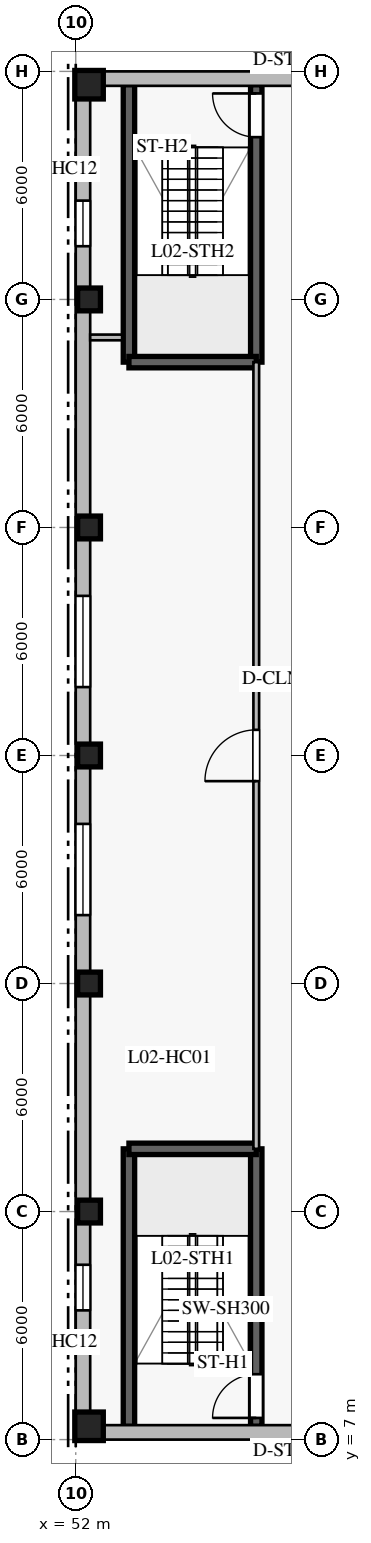
"""IFC4 building model, lengths in metres.
Left out: names, types, materials, properties, quantities, classifications, styles, units other than length and angle.
Written with IfcOpenShell. Run it as: python <this file> out.ifc"""

import sys

from ifc_helpers import new_model, si_unit, direction, frame, frame_2d, origin, origin_2d, place, context, subcontext, project, spatial, rectangle, extrude, element, fill, save


model = new_model("IFC4")
c1 = context("Model", 3, precision=1e-05, world=origin(), true_north=direction((0.0, 1.0)))
c2 = subcontext(c1, "Body", "Model", "MODEL_VIEW")
j1 = project(units=[si_unit("LENGTHUNIT", "METRE"), si_unit("PLANEANGLEUNIT", "RADIAN")], contexts=[c1])
p1 = place(None, origin())
s1 = spatial("IfcSite", under=j1, at=p1, CompositionType="ELEMENT")
p2 = place(p1, origin())
s2 = spatial("IfcBuilding", under=s1, at=p2, CompositionType="ELEMENT")
p3 = place(p2, frame((0.0, 0.0, 9.8)))
s3 = spatial("IfcBuildingStorey", under=s2, at=p3, CompositionType="ELEMENT", Elevation=9.8)
p4 = place(p3, frame((56.75, 7.35, 0.0), z_axis=(0.0, 0.0, 1.0), x_axis=(0.0, 1.0, 0.0)))
e1 = element("IfcWall", 1, at=p4, inside=s3, PredefinedType="SOLIDWALL", context=c2, shape_type="SweptSolid", body=[
    extrude(rectangle(XDim=7.3, YDim=0.3, at=frame_2d((3.65, 0.0))), origin(), (0.0, 0.0, 1.0), 4.34),
])
p5 = place(p4, frame((0.22, 0.0, 0.0)))
e2 = element("IfcOpeningElement", 2, at=p5, cuts=e1, PredefinedType="OPENING", context=c2, shape_type="SweptSolid", body=[
    extrude(rectangle(XDim=1.15, YDim=2.2, at=frame_2d((0.575, 1.1))), frame((0.0, 0.16, 0.0), z_axis=(0.0, -1.0, 0.0), x_axis=(1.0, 0.0, 0.0)), (0.0, 0.0, 1.0), 0.32),
])
p6 = place(p3, frame((53.4, 7.35, 0.0), z_axis=(0.0, 0.0, 1.0), x_axis=(0.0, 1.0, 0.0)))
e3 = element("IfcWall", 3, at=p6, inside=s3, PredefinedType="SOLIDWALL", context=c2, shape_type="SweptSolid", body=[
    extrude(rectangle(XDim=7.3, YDim=0.3, at=frame_2d((3.65, 0.0))), origin(), (0.0, 0.0, 1.0), 4.34),
])
p7 = place(p3, frame((53.4, 14.65, 0.0), z_axis=(0.0, 0.0, 1.0), x_axis=(1.0, 0.0, 0.0)))
e4 = element("IfcWall", 4, at=p7, inside=s3, PredefinedType="SOLIDWALL", context=c2, shape_type="SweptSolid", body=[
    extrude(rectangle(XDim=3.35, YDim=0.3, at=frame_2d((1.675, 0.0))), origin(), (0.0, 0.0, 1.0), 4.34),
])
p8 = place(p3, frame((56.75, 35.35, 0.0), z_axis=(0.0, 0.0, 1.0), x_axis=(0.0, 1.0, 0.0)))
e5 = element("IfcWall", 5, at=p8, inside=s3, PredefinedType="SOLIDWALL", context=c2, shape_type="SweptSolid", body=[
    extrude(rectangle(XDim=7.3, YDim=0.3, at=frame_2d((3.65, 0.0))), origin(), (0.0, 0.0, 1.0), 4.34),
])
p9 = place(p8, frame((5.92, 0.0, 0.0)))
e6 = element("IfcOpeningElement", 6, at=p9, cuts=e5, PredefinedType="OPENING", context=c2, shape_type="SweptSolid", body=[
    extrude(rectangle(XDim=1.15, YDim=2.2, at=frame_2d((0.575, 1.1))), frame((0.0, 0.16, 0.0), z_axis=(0.0, -1.0, 0.0), x_axis=(1.0, 0.0, 0.0)), (0.0, 0.0, 1.0), 0.32),
])
p10 = place(p3, frame((53.4, 35.35, 0.0), z_axis=(0.0, 0.0, 1.0), x_axis=(0.0, 1.0, 0.0)))
e7 = element("IfcWall", 7, at=p10, inside=s3, PredefinedType="SOLIDWALL", context=c2, shape_type="SweptSolid", body=[
    extrude(rectangle(XDim=7.3, YDim=0.3, at=frame_2d((3.65, 0.0))), origin(), (0.0, 0.0, 1.0), 4.34),
])
p11 = place(p3, frame((53.4, 35.35, 0.0), z_axis=(0.0, 0.0, 1.0), x_axis=(1.0, 0.0, 0.0)))
e8 = element("IfcWall", 8, at=p11, inside=s3, PredefinedType="SOLIDWALL", context=c2, shape_type="SweptSolid", body=[
    extrude(rectangle(XDim=3.35, YDim=0.3, at=frame_2d((1.675, 0.0))), origin(), (0.0, 0.0, 1.0), 4.34),
])
p12 = place(p3, frame((52.35, 7.35, 0.0), z_axis=(0.0, 0.0, 1.0), x_axis=(1.0, 0.0, 0.0)))
e9 = element("IfcColumn", 9, at=p12, inside=s3, PredefinedType="COLUMN", context=c2, shape_type="SweptSolid", body=[
    extrude(rectangle(XDim=0.75, YDim=0.75, at=origin_2d()), origin(), (0.0, 0.0, 1.0), 4.6),
])
for number, where, z_axis, x_axis in (
    (10, (52.35, 13.0, 0.0), (0.0, 0.0, 1.0), (1.0, 0.0, 0.0)),
    (11, (52.35, 19.0, 0.0), (0.0, 0.0, 1.0), (1.0, 0.0, 0.0)),
    (12, (52.35, 25.0, 0.0), (0.0, 0.0, 1.0), (1.0, 0.0, 0.0)),
    (13, (52.35, 31.0, 0.0), (0.0, 0.0, 1.0), (1.0, 0.0, 0.0)),
    (14, (52.35, 37.0, 0.0), (0.0, 0.0, 1.0), (1.0, 0.0, 0.0)),
):
    element("IfcColumn", number, at=place(p3, frame(where, z_axis=z_axis, x_axis=x_axis)), inside=s3, PredefinedType="COLUMN", context=c2, shape_type="SweptSolid", body=[
        extrude(rectangle(XDim=0.6, YDim=0.6, at=origin_2d()), origin(), (0.0, 0.0, 1.0), 4.6),
    ])
p13 = place(p3, frame((52.35, 42.65, 0.0), z_axis=(0.0, 0.0, 1.0), x_axis=(1.0, 0.0, 0.0)))
e15 = element("IfcColumn", 15, at=p13, inside=s3, PredefinedType="COLUMN", context=c2, shape_type="SweptSolid", body=[
    extrude(rectangle(XDim=0.75, YDim=0.75, at=origin_2d()), origin(), (0.0, 0.0, 1.0), 4.6),
])
p14 = place(p3, frame((75.0, 7.19, 0.0), z_axis=(0.0, 0.0, 1.0), x_axis=(-1.0, 0.0, 0.0)))
e16 = element("IfcWall", 16, at=p14, inside=s3, PredefinedType="STANDARD", context=c2, shape_type="SweptSolid", body=[
    extrude(rectangle(XDim=23.0, YDim=0.38, at=frame_2d((11.5, 0.0))), origin(), (0.0, 0.0, 1.0), 4.34),
])
p15 = place(p14, frame((10.3, 0.0, 0.95)))
e17 = element("IfcOpeningElement", 17, at=p15, cuts=e16, PredefinedType="OPENING", context=c2, shape_type="SweptSolid", body=[
    extrude(rectangle(XDim=2.4, YDim=1.8, at=frame_2d((1.2, 0.9))), frame((0.0, 0.2, 0.0), z_axis=(0.0, -1.0, 0.0), x_axis=(1.0, 0.0, 0.0)), (0.0, 0.0, 1.0), 0.4),
])
p16 = place(p3, frame((52.0, 42.81, 0.0), z_axis=(0.0, 0.0, 1.0), x_axis=(1.0, 0.0, 0.0)))
e18 = element("IfcWall", 18, at=p16, inside=s3, PredefinedType="STANDARD", context=c2, shape_type="SweptSolid", body=[
    extrude(rectangle(XDim=23.0, YDim=0.38, at=frame_2d((11.5, 0.0))), origin(), (0.0, 0.0, 1.0), 4.34),
])
p17 = place(p16, frame((10.3, 0.0, 0.95)))
e19 = element("IfcOpeningElement", 19, at=p17, cuts=e18, PredefinedType="OPENING", context=c2, shape_type="SweptSolid", body=[
    extrude(rectangle(XDim=2.4, YDim=1.8, at=frame_2d((1.2, 0.9))), frame((0.0, 0.2, 0.0), z_axis=(0.0, -1.0, 0.0), x_axis=(1.0, 0.0, 0.0)), (0.0, 0.0, 1.0), 0.4),
])
p18 = place(p3, frame((52.19, 7.38, 0.0), z_axis=(0.0, 0.0, 1.0), x_axis=(0.0, 1.0, 0.0)))
e20 = element("IfcWall", 20, at=p18, inside=s3, PredefinedType="STANDARD", context=c2, shape_type="SweptSolid", body=[
    extrude(rectangle(XDim=35.24, YDim=0.38, at=frame_2d((17.62, 0.0))), origin(), (0.0, 0.0, 1.0), 4.34),
])
p19 = place(p18, frame((3.02, 0.0, 0.95)))
e21 = element("IfcOpeningElement", 21, at=p19, cuts=e20, PredefinedType="OPENING", context=c2, shape_type="SweptSolid", body=[
    extrude(rectangle(XDim=1.2, YDim=1.8, at=frame_2d((0.6, 0.9))), frame((0.0, 0.2, 0.0), z_axis=(0.0, -1.0, 0.0), x_axis=(1.0, 0.0, 0.0)), (0.0, 0.0, 1.0), 0.4),
])
p20 = place(p18, frame((13.42, 0.0, 0.95)))
e22 = element("IfcOpeningElement", 22, at=p20, cuts=e20, PredefinedType="OPENING", context=c2, shape_type="SweptSolid", body=[
    extrude(rectangle(XDim=2.4, YDim=1.8, at=frame_2d((1.2, 0.9))), frame((0.0, 0.2, 0.0), z_axis=(0.0, -1.0, 0.0), x_axis=(1.0, 0.0, 0.0)), (0.0, 0.0, 1.0), 0.4),
])
p21 = place(p18, frame((19.42, 0.0, 0.95)))
e23 = element("IfcOpeningElement", 23, at=p21, cuts=e20, PredefinedType="OPENING", context=c2, shape_type="SweptSolid", body=[
    extrude(rectangle(XDim=2.4, YDim=1.8, at=frame_2d((1.2, 0.9))), frame((0.0, 0.2, 0.0), z_axis=(0.0, -1.0, 0.0), x_axis=(1.0, 0.0, 0.0)), (0.0, 0.0, 1.0), 0.4),
])
p22 = place(p18, frame((31.02, 0.0, 0.95)))
e24 = element("IfcOpeningElement", 24, at=p22, cuts=e20, PredefinedType="OPENING", context=c2, shape_type="SweptSolid", body=[
    extrude(rectangle(XDim=1.2, YDim=1.8, at=frame_2d((0.6, 0.9))), frame((0.0, 0.2, 0.0), z_axis=(0.0, -1.0, 0.0), x_axis=(1.0, 0.0, 0.0)), (0.0, 0.0, 1.0), 0.4),
])
p23 = place(p3, frame((56.75, 14.65, 0.0), z_axis=(0.0, 0.0, 1.0), x_axis=(0.0, 1.0, 0.0)))
e25 = element("IfcWall", 25, at=p23, inside=s3, PredefinedType="PARTITIONING", context=c2, shape_type="SweptSolid", body=[
    extrude(rectangle(XDim=20.7, YDim=0.15, at=frame_2d((10.35, 0.0))), origin(), (0.0, 0.0, 1.0), 4.34),
])
p24 = place(p23, frame((9.675, 0.0, 0.0)))
e26 = element("IfcOpeningElement", 26, at=p24, cuts=e25, PredefinedType="OPENING", context=c2, shape_type="SweptSolid", body=[
    extrude(rectangle(XDim=1.35, YDim=2.2, at=frame_2d((0.675, 1.1))), frame((0.0, 0.085, 0.0), z_axis=(0.0, -1.0, 0.0), x_axis=(1.0, 0.0, 0.0)), (0.0, 0.0, 1.0), 0.17),
])
p25 = place(p3, frame((52.38, 36.0, 0.0), z_axis=(0.0, 0.0, 1.0), x_axis=(1.0, 0.0, 0.0)))
e27 = element("IfcWall", 27, at=p25, inside=s3, PredefinedType="PARTITIONING", context=c2, shape_type="SweptSolid", body=[
    extrude(rectangle(XDim=0.84, YDim=0.15, at=frame_2d((0.42, 0.0))), origin(), (0.0, 0.0, 1.0), 3.98),
])
p26 = place(p19, origin())
e28 = element("IfcWindow", 28, at=p26, inside=s3, PartitioningType="SINGLE_PANEL", PredefinedType="WINDOW", context=c2, shape_type="SweptSolid", body=[
    extrude(rectangle(XDim=1.2, YDim=1.8, at=frame_2d((0.6, 0.9))), frame((0.0, 0.03, 0.0), z_axis=(0.0, -1.0, 0.0), x_axis=(1.0, 0.0, 0.0)), (0.0, 0.0, 1.0), 0.06),
])
fill(e21, e28)
p27 = place(p20, origin())
e29 = element("IfcWindow", 29, at=p27, inside=s3, PartitioningType="TRIPLE_PANEL_VERTICAL", PredefinedType="WINDOW", context=c2, shape_type="SweptSolid", body=[
    extrude(rectangle(XDim=2.4, YDim=1.8, at=frame_2d((1.2, 0.9))), frame((0.0, 0.03, 0.0), z_axis=(0.0, -1.0, 0.0), x_axis=(1.0, 0.0, 0.0)), (0.0, 0.0, 1.0), 0.06),
])
fill(e22, e29)
p28 = place(p21, origin())
e30 = element("IfcWindow", 30, at=p28, inside=s3, PartitioningType="TRIPLE_PANEL_VERTICAL", PredefinedType="WINDOW", context=c2, shape_type="SweptSolid", body=[
    extrude(rectangle(XDim=2.4, YDim=1.8, at=frame_2d((1.2, 0.9))), frame((0.0, 0.03, 0.0), z_axis=(0.0, -1.0, 0.0), x_axis=(1.0, 0.0, 0.0)), (0.0, 0.0, 1.0), 0.06),
])
fill(e23, e30)
p29 = place(p22, origin())
e31 = element("IfcWindow", 31, at=p29, inside=s3, PartitioningType="SINGLE_PANEL", PredefinedType="WINDOW", context=c2, shape_type="SweptSolid", body=[
    extrude(rectangle(XDim=1.2, YDim=1.8, at=frame_2d((0.6, 0.9))), frame((0.0, 0.03, 0.0), z_axis=(0.0, -1.0, 0.0), x_axis=(1.0, 0.0, 0.0)), (0.0, 0.0, 1.0), 0.06),
])
fill(e24, e31)
p30 = place(p5, origin())
e32 = element("IfcDoor", 32, at=p30, inside=s3, OperationType="SINGLE_SWING_LEFT", PredefinedType="DOOR", context=c2, shape_type="SweptSolid", body=[
    extrude(rectangle(XDim=1.15, YDim=2.2, at=frame_2d((0.575, 1.1))), frame((0.0, 0.025, 0.0), z_axis=(0.0, -1.0, 0.0), x_axis=(1.0, 0.0, 0.0)), (0.0, 0.0, 1.0), 0.05),
])
fill(e2, e32)
p31 = place(p9, origin())
e33 = element("IfcDoor", 33, at=p31, inside=s3, OperationType="SINGLE_SWING_RIGHT", PredefinedType="DOOR", context=c2, shape_type="SweptSolid", body=[
    extrude(rectangle(XDim=1.15, YDim=2.2, at=frame_2d((0.575, 1.1))), frame((0.0, 0.025, 0.0), z_axis=(0.0, -1.0, 0.0), x_axis=(1.0, 0.0, 0.0)), (0.0, 0.0, 1.0), 0.05),
])
fill(e6, e33)
p32 = place(p24, origin())
e34 = element("IfcDoor", 34, at=p32, inside=s3, OperationType="SINGLE_SWING_LEFT", PredefinedType="DOOR", context=c2, shape_type="SweptSolid", body=[
    extrude(rectangle(XDim=1.35, YDim=2.2, at=frame_2d((0.675, 1.1))), frame((0.0, 0.025, 0.0), z_axis=(0.0, -1.0, 0.0), x_axis=(1.0, 0.0, 0.0)), (0.0, 0.0, 1.0), 0.05),
])
fill(e26, e34)
save(model, sys.argv[1])
